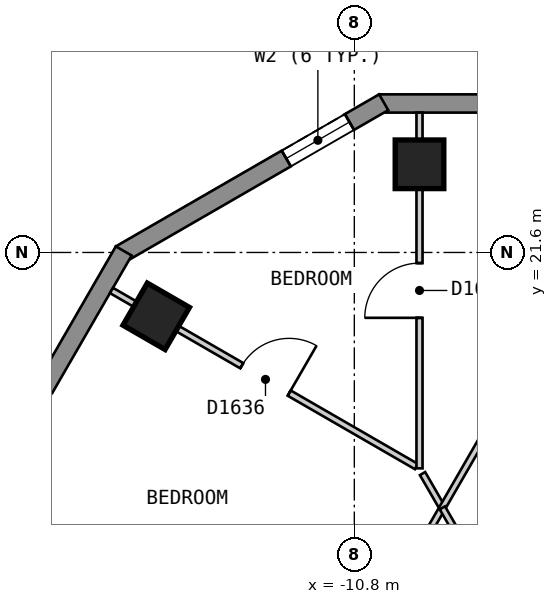
"""IFC4 building model, lengths in metres.
Left out: names, types, materials, properties, quantities, classifications, styles, units other than length and angle.
Written with IfcOpenShell. Run it as: python <this file> out.ifc"""

import sys

from ifc_helpers import new_model, si_unit, direction, frame, frame_2d, origin, origin_2d, place, context, subcontext, project, spatial, polyline, rectangle, outline, extrude, element, fill, save


model = new_model("IFC4")
c1 = context("Model", 3, precision=1e-05, world=origin(), true_north=direction((0.0, 1.0)))
c2 = subcontext(c1, "Body", "Model", "MODEL_VIEW")
j1 = project(units=[si_unit("LENGTHUNIT", "METRE"), si_unit("PLANEANGLEUNIT", "RADIAN")], contexts=[c1])
p1 = place(None, origin())
s1 = spatial("IfcSite", under=j1, at=p1, CompositionType="ELEMENT")
p2 = place(p1, origin())
s2 = spatial("IfcBuilding", under=s1, at=p2, CompositionType="ELEMENT")
p3 = place(p2, frame((0.0, 0.0, 169.2)))
s3 = spatial("IfcBuildingStorey", under=s2, at=p3, CompositionType="ELEMENT", Elevation=169.2)
for number, where, z_axis, x_axis in (
    (1, (-9.728, 23.05, 0.0), (0.0, 0.0, 1.0), (-1.0, 0.0, 0.0)),
    (2, (-14.058, 20.55, 0.0), (0.0, 0.0, 1.0), (-0.5, -0.866, 0.0)),
):
    element("IfcColumn", number, at=place(p3, frame(where, z_axis=z_axis, x_axis=x_axis)), inside=s3, PredefinedType="COLUMN", context=c2, shape_type="SweptSolid", body=[
        extrude(rectangle(XDim=0.8, YDim=0.8, at=origin_2d()), origin(), (0.0, 0.0, 1.0), 3.0),
    ])
p4 = place(p3, frame((10.392, 24.05, 0.0), z_axis=(0.0, 0.0, 1.0), x_axis=(-1.0, 0.0, 0.0)))
e3 = element("IfcWall", 3, at=p4, inside=s3, PredefinedType="SOLIDWALL", context=c2, shape_type="SweptSolid", body=[
    extrude(outline(polyline([(0.0, -0.15), (20.784, -0.15), (20.704, 0.15), (0.08, 0.15), (0.0, -0.15)])), origin(), (0.0, 0.0, 1.0), 2.7),
])
p5 = place(p4, frame((2.346, 0.0, 0.15)))
e4 = element("IfcOpeningElement", 4, at=p5, cuts=e3, PredefinedType="OPENING", context=c2, shape_type="SweptSolid", body=[
    extrude(rectangle(XDim=1.5, YDim=2.1, at=frame_2d((0.75, 1.05))), frame((0.0, 0.16, 0.0), z_axis=(0.0, -1.0, 0.0), x_axis=(1.0, 0.0, 0.0)), (0.0, 0.0, 1.0), 0.32),
])
p6 = place(p4, frame((7.21, 0.0, 0.15)))
e5 = element("IfcOpeningElement", 5, at=p6, cuts=e3, PredefinedType="OPENING", context=c2, shape_type="SweptSolid", body=[
    extrude(rectangle(XDim=1.5, YDim=2.1, at=frame_2d((0.75, 1.05))), frame((0.0, 0.16, 0.0), z_axis=(0.0, -1.0, 0.0), x_axis=(1.0, 0.0, 0.0)), (0.0, 0.0, 1.0), 0.32),
])
p7 = place(p4, frame((12.074, 0.0, 0.15)))
e6 = element("IfcOpeningElement", 6, at=p7, cuts=e3, PredefinedType="OPENING", context=c2, shape_type="SweptSolid", body=[
    extrude(rectangle(XDim=1.5, YDim=2.1, at=frame_2d((0.75, 1.05))), frame((0.0, 0.16, 0.0), z_axis=(0.0, -1.0, 0.0), x_axis=(1.0, 0.0, 0.0)), (0.0, 0.0, 1.0), 0.32),
])
p8 = place(p4, frame((16.938, 0.0, 0.15)))
e7 = element("IfcOpeningElement", 7, at=p8, cuts=e3, PredefinedType="OPENING", context=c2, shape_type="SweptSolid", body=[
    extrude(rectangle(XDim=1.5, YDim=2.1, at=frame_2d((0.75, 1.05))), frame((0.0, 0.16, 0.0), z_axis=(0.0, -1.0, 0.0), x_axis=(1.0, 0.0, 0.0)), (0.0, 0.0, 1.0), 0.32),
])
p9 = place(p3, frame((-10.317, 24.07, 0.0), z_axis=(0.0, 0.0, 1.0), x_axis=(-0.866022959057, -0.500004234368, 0.0)))
e8 = element("IfcWall", 8, at=p9, inside=s3, PredefinedType="SOLIDWALL", context=c2, shape_type="SweptSolid", body=[
    extrude(outline(polyline([(0.0, -0.15), (5.0, -0.15), (4.92, 0.15), (0.08, 0.15), (0.0, -0.15)])), origin(), (0.0, 0.0, 1.0), 2.7),
])
p10 = place(p9, frame((0.65, 0.0, 0.15)))
e9 = element("IfcOpeningElement", 9, at=p10, cuts=e8, PredefinedType="OPENING", context=c2, shape_type="SweptSolid", body=[
    extrude(rectangle(XDim=1.2, YDim=2.1, at=frame_2d((0.6, 1.05))), frame((0.0, 0.16, 0.0), z_axis=(0.0, -1.0, 0.0), x_axis=(1.0, 0.0, 0.0)), (0.0, 0.0, 1.0), 0.32),
])
p11 = place(p3, frame((-14.592, 21.625, 0.0), z_axis=(0.0, 0.0, 1.0), x_axis=(-0.500010537973, -0.866019319597, 0.0)))
e10 = element("IfcWall", 10, at=p11, inside=s3, PredefinedType="SOLIDWALL", context=c2, shape_type="SweptSolid", body=[
    extrude(outline(polyline([(0.0, -0.15), (22.863, -0.15), (22.783, 0.15), (0.08, 0.15), (0.0, -0.15)])), origin(), (0.0, 0.0, 1.0), 2.7),
])
p12 = place(p11, frame((2.606, 0.0, 0.15)))
e11 = element("IfcOpeningElement", 11, at=p12, cuts=e10, PredefinedType="OPENING", context=c2, shape_type="SweptSolid", body=[
    extrude(rectangle(XDim=1.5, YDim=2.1, at=frame_2d((0.75, 1.05))), frame((0.0, 0.16, 0.0), z_axis=(0.0, -1.0, 0.0), x_axis=(1.0, 0.0, 0.0)), (0.0, 0.0, 1.0), 0.32),
])
p13 = place(p11, frame((7.99, 0.0, 0.15)))
e12 = element("IfcOpeningElement", 12, at=p13, cuts=e10, PredefinedType="OPENING", context=c2, shape_type="SweptSolid", body=[
    extrude(rectangle(XDim=1.5, YDim=2.1, at=frame_2d((0.75, 1.05))), frame((0.0, 0.16, 0.0), z_axis=(0.0, -1.0, 0.0), x_axis=(1.0, 0.0, 0.0)), (0.0, 0.0, 1.0), 0.32),
])
p14 = place(p11, frame((13.373, 0.0, 0.15)))
e13 = element("IfcOpeningElement", 13, at=p14, cuts=e10, PredefinedType="OPENING", context=c2, shape_type="SweptSolid", body=[
    extrude(rectangle(XDim=1.5, YDim=2.1, at=frame_2d((0.75, 1.05))), frame((0.0, 0.16, 0.0), z_axis=(0.0, -1.0, 0.0), x_axis=(1.0, 0.0, 0.0)), (0.0, 0.0, 1.0), 0.32),
])
p15 = place(p11, frame((18.758, 0.0, 0.15)))
e14 = element("IfcOpeningElement", 14, at=p15, cuts=e10, PredefinedType="OPENING", context=c2, shape_type="SweptSolid", body=[
    extrude(rectangle(XDim=1.5, YDim=2.1, at=frame_2d((0.75, 1.05))), frame((0.0, 0.16, 0.0), z_axis=(0.0, -1.0, 0.0), x_axis=(1.0, 0.0, 0.0)), (0.0, 0.0, 1.0), 0.32),
])
p16 = place(p3, frame((-10.771, 8.144, 0.0), z_axis=(0.0, 0.0, 1.0), x_axis=(0.500008507724, 0.866020491792, 0.0)))
e15 = element("IfcWall", 15, at=p16, inside=s3, PredefinedType="PARTITIONING", context=c2, shape_type="SweptSolid", body=[
    extrude(rectangle(XDim=10.688, YDim=0.2, at=frame_2d((5.344, 0.0))), origin(), (0.0, 0.0, 1.0), 2.7),
])
p17 = place(p16, frame((9.692, 0.0, 0.0)))
e16 = element("IfcOpeningElement", 16, at=p17, cuts=e15, PredefinedType="OPENING", context=c2, shape_type="SweptSolid", body=[
    extrude(rectangle(XDim=0.8, YDim=2.1, at=frame_2d((0.4, 1.05))), frame((0.0, 0.11, 0.0), z_axis=(0.0, -1.0, 0.0), x_axis=(1.0, 0.0, 0.0)), (0.0, 0.0, 1.0), 0.22),
])
p18 = place(p16, frame((0.549, 0.0, 0.0)))
e17 = element("IfcOpeningElement", 17, at=p18, cuts=e15, PredefinedType="OPENING", context=c2, shape_type="SweptSolid", body=[
    extrude(rectangle(XDim=1.0, YDim=2.1, at=frame_2d((0.5, 1.05))), frame((0.0, 0.11, 0.0), z_axis=(0.0, -1.0, 0.0), x_axis=(1.0, 0.0, 0.0)), (0.0, 0.0, 1.0), 0.22),
])
p19 = place(p3, frame((-9.678, 17.964, 0.0), z_axis=(0.0, 0.0, 1.0), x_axis=(0.500208928872, -0.865904745036, 0.0)))
e18 = element("IfcWall", 18, at=p19, inside=s3, PredefinedType="PARTITIONING", context=c2, shape_type="SweptSolid", body=[
    extrude(rectangle(XDim=0.652, YDim=0.1, at=frame_2d((0.326, 0.0))), origin(), (0.0, 0.0, 1.0), 2.7),
])
p20 = place(p3, frame((-14.794, 20.975, 0.0), z_axis=(0.0, 0.0, 1.0), x_axis=(0.866019221245, -0.500010708319, 0.0)))
e19 = element("IfcWall", 19, at=p20, inside=s3, PredefinedType="PARTITIONING", context=c2, shape_type="SweptSolid", body=[
    extrude(rectangle(XDim=5.792, YDim=0.1, at=frame_2d((2.896, 0.0))), origin(), (0.0, 0.0, 1.0), 2.7),
])
p21 = place(p20, frame((2.475, 0.0, 0.0)))
e20 = element("IfcOpeningElement", 20, at=p21, cuts=e19, PredefinedType="OPENING", context=c2, shape_type="SweptSolid", body=[
    extrude(rectangle(XDim=0.9, YDim=2.1, at=frame_2d((0.45, 1.05))), frame((0.0, 0.06, 0.0), z_axis=(0.0, -1.0, 0.0), x_axis=(1.0, 0.0, 0.0)), (0.0, 0.0, 1.0), 0.12),
])
p22 = place(p3, frame((-8.763, 18.321, 0.0), z_axis=(0.0, 0.0, 1.0), x_axis=(0.798861914713, -0.601514456369, 0.0)))
e21 = element("IfcWall", 21, at=p22, inside=s3, PredefinedType="PARTITIONING", context=c2, shape_type="SweptSolid", body=[
    extrude(rectangle(XDim=3.273, YDim=0.1, at=frame_2d((1.637, 0.0))), origin(), (0.0, 0.0, 1.0), 2.7),
])
p23 = place(p22, frame((1.212, 0.0, 0.0)))
e22 = element("IfcOpeningElement", 22, at=p23, cuts=e21, PredefinedType="OPENING", context=c2, shape_type="SweptSolid", body=[
    extrude(rectangle(XDim=0.9, YDim=2.1, at=frame_2d((0.45, 1.05))), frame((0.0, 0.06, 0.0), z_axis=(0.0, -1.0, 0.0), x_axis=(1.0, 0.0, 0.0)), (0.0, 0.0, 1.0), 0.12),
])
p24 = place(p3, frame((-11.806, 13.149, 0.0), z_axis=(0.0, 0.0, 1.0), x_axis=(0.499932199895, 0.866064544655, 0.0)))
e23 = element("IfcWall", 23, at=p24, inside=s3, PredefinedType="PARTITIONING", context=c2, shape_type="SweptSolid", body=[
    extrude(rectangle(XDim=8.833, YDim=0.1, at=frame_2d((4.417, 0.0))), origin(), (0.0, 0.0, 1.0), 2.7),
])
p25 = place(p24, frame((6.413, 0.0, 0.0)))
e24 = element("IfcOpeningElement", 24, at=p25, cuts=e23, PredefinedType="OPENING", context=c2, shape_type="SweptSolid", body=[
    extrude(rectangle(XDim=0.9, YDim=2.1, at=frame_2d((0.45, 1.05))), frame((0.0, 0.06, 0.0), z_axis=(0.0, -1.0, 0.0), x_axis=(1.0, 0.0, 0.0)), (0.0, 0.0, 1.0), 0.12),
])
p26 = place(p24, frame((2.004, 0.0, 0.0)))
e25 = element("IfcOpeningElement", 25, at=p26, cuts=e23, PredefinedType="OPENING", context=c2, shape_type="SweptSolid", body=[
    extrude(rectangle(XDim=0.8, YDim=2.1, at=frame_2d((0.4, 1.05))), frame((0.0, 0.06, 0.0), z_axis=(0.0, -1.0, 0.0), x_axis=(1.0, 0.0, 0.0)), (0.0, 0.0, 1.0), 0.12),
])
p27 = place(p3, frame((-9.728, 18.05, 0.0), z_axis=(0.0, 0.0, 1.0), x_axis=(0.0, 1.0, 0.0)))
e26 = element("IfcWall", 26, at=p27, inside=s3, PredefinedType="PARTITIONING", context=c2, shape_type="SweptSolid", body=[
    extrude(rectangle(XDim=5.85, YDim=0.1, at=frame_2d((2.925, 0.0))), origin(), (0.0, 0.0, 1.0), 2.7),
])
p28 = place(p27, frame((2.475, 0.0, 0.0)))
e27 = element("IfcOpeningElement", 27, at=p28, cuts=e26, PredefinedType="OPENING", context=c2, shape_type="SweptSolid", body=[
    extrude(rectangle(XDim=0.9, YDim=2.1, at=frame_2d((0.45, 1.05))), frame((0.0, 0.06, 0.0), z_axis=(0.0, -1.0, 0.0), x_axis=(1.0, 0.0, 0.0)), (0.0, 0.0, 1.0), 0.12),
])
p29 = place(p3, frame((-9.352, 17.4, 0.0), z_axis=(0.0, 0.0, 1.0), x_axis=(0.499785326313, -0.866149310225, 0.0)))
e28 = element("IfcWall", 28, at=p29, inside=s3, PredefinedType="PARTITIONING", context=c2, shape_type="SweptSolid", body=[
    extrude(rectangle(XDim=3.81, YDim=0.1, at=frame_2d((1.905, 0.0))), origin(), (0.0, 0.0, 1.0), 2.7),
])
p30 = place(p10, origin())
e29 = element("IfcWindow", 29, at=p30, inside=s3, PartitioningType="SINGLE_PANEL", PredefinedType="WINDOW", context=c2, shape_type="SweptSolid", body=[
    extrude(rectangle(XDim=1.2, YDim=2.1, at=frame_2d((0.6, 1.05))), frame((0.0, 0.03, 0.0), z_axis=(0.0, -1.0, 0.0), x_axis=(1.0, 0.0, 0.0)), (0.0, 0.0, 1.0), 0.06),
])
fill(e9, e29)
p31 = place(p28, origin())
e30 = element("IfcDoor", 30, at=p31, inside=s3, OperationType="SINGLE_SWING_LEFT", PredefinedType="DOOR", context=c2, shape_type="SweptSolid", body=[
    extrude(rectangle(XDim=0.9, YDim=2.1, at=frame_2d((0.45, 1.05))), frame((0.0, 0.025, 0.0), z_axis=(0.0, -1.0, 0.0), x_axis=(1.0, 0.0, 0.0)), (0.0, 0.0, 1.0), 0.05),
])
fill(e27, e30)
p32 = place(p21, origin())
e31 = element("IfcDoor", 31, at=p32, inside=s3, OperationType="SINGLE_SWING_RIGHT", PredefinedType="DOOR", context=c2, shape_type="SweptSolid", body=[
    extrude(rectangle(XDim=0.9, YDim=2.1, at=frame_2d((0.45, 1.05))), frame((0.0, 0.025, 0.0), z_axis=(0.0, -1.0, 0.0), x_axis=(1.0, 0.0, 0.0)), (0.0, 0.0, 1.0), 0.05),
])
fill(e20, e31)
save(model, sys.argv[1])
